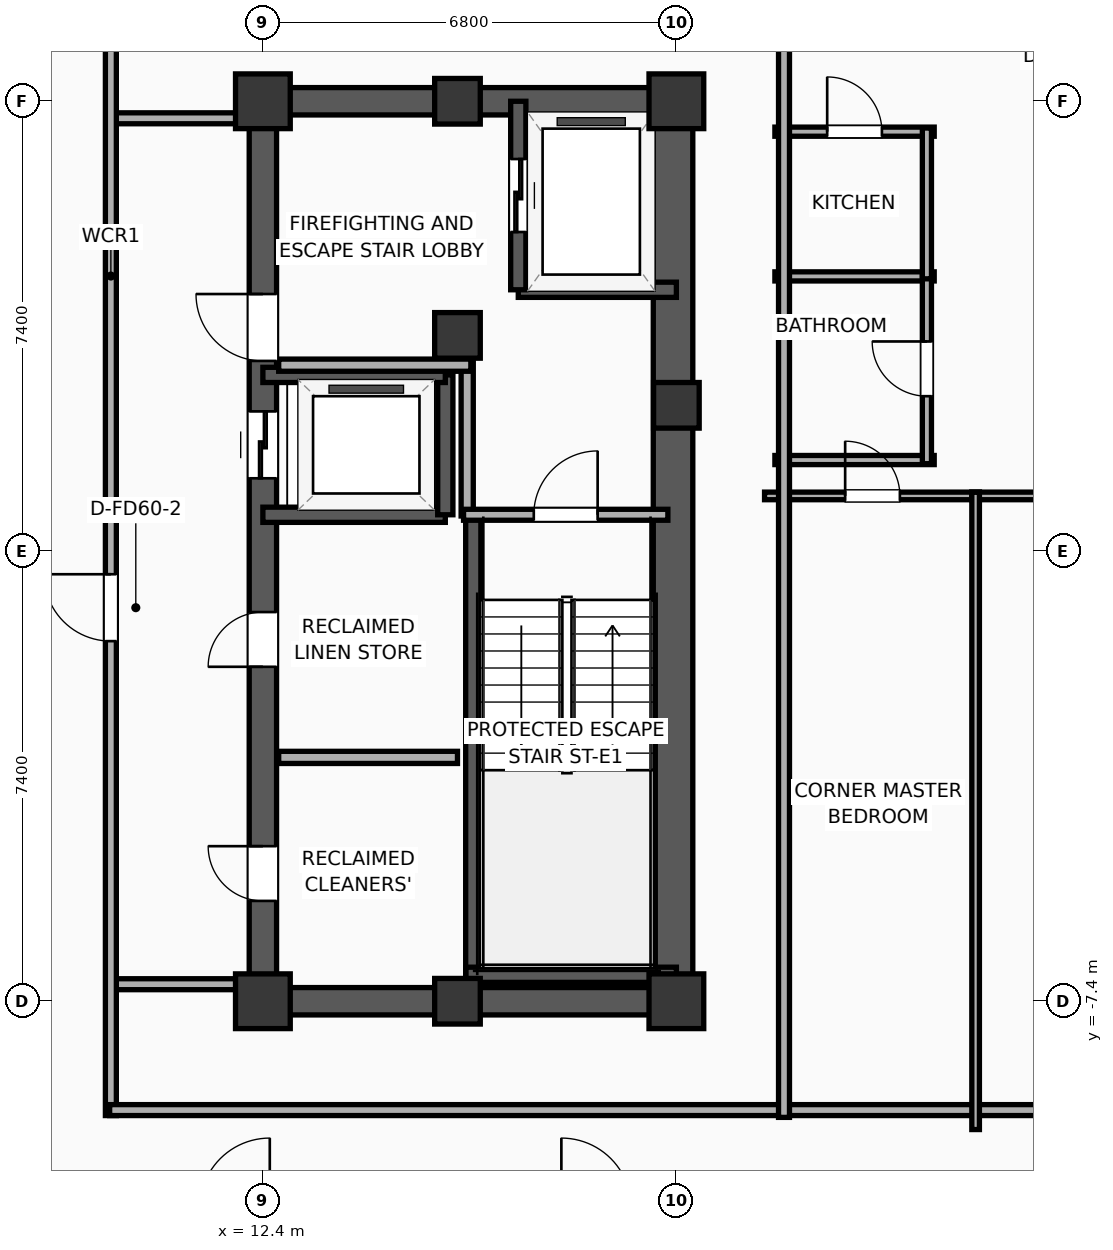
"""IFC4 building model, lengths in metres.
Left out: names, types, materials, properties, quantities, classifications, styles, units other than length and angle.
Written with IfcOpenShell. Run it as: python <this file> out.ifc"""

import sys

from ifc_helpers import new_model, si_unit, direction, frame, frame_2d, origin, origin_2d, place, context, subcontext, project, spatial, rectangle, extrude, element, fill, save


model = new_model("IFC4")
c1 = context("Model", 3, precision=1e-05, world=origin(), true_north=direction((0.0, 1.0)))
c2 = subcontext(c1, "Body", "Model", "MODEL_VIEW")
j1 = project(units=[si_unit("LENGTHUNIT", "METRE"), si_unit("PLANEANGLEUNIT", "RADIAN")], contexts=[c1])
p1 = place(None, origin())
s1 = spatial("IfcSite", under=j1, at=p1, CompositionType="ELEMENT")
p2 = place(p1, origin())
s2 = spatial("IfcBuilding", under=s1, at=p2, CompositionType="ELEMENT")
p3 = place(p2, frame((0.0, 0.0, 219.7)))
s3 = spatial("IfcBuildingStorey", under=s2, at=p3, CompositionType="ELEMENT", Elevation=219.7)
p4 = place(p3, frame((12.4, -7.4, 0.0), z_axis=(0.0, 0.0, 1.0), x_axis=(1.0, 0.0, 0.0)))
e1 = element("IfcColumn", 1, at=p4, inside=s3, PredefinedType="COLUMN", context=c2, shape_type="SweptSolid", body=[
    extrude(rectangle(XDim=0.9, YDim=0.9, at=origin_2d()), origin(), (0.0, 0.0, 1.0), 3.9),
])
p5 = place(p3, frame((15.6, 3.55, 0.0), z_axis=(0.0, 0.0, 1.0), x_axis=(1.0, 0.0, 0.0)))
e2 = element("IfcColumn", 2, at=p5, inside=s3, PredefinedType="COLUMN", context=c2, shape_type="SweptSolid", body=[
    extrude(rectangle(XDim=0.75, YDim=0.75, at=origin_2d()), origin(), (0.0, 0.0, 1.0), 3.9),
])
p6 = place(p3, frame((12.4, 7.4, 0.0), z_axis=(0.0, 0.0, 1.0), x_axis=(1.0, 0.0, 0.0)))
e3 = element("IfcColumn", 3, at=p6, inside=s3, PredefinedType="COLUMN", context=c2, shape_type="SweptSolid", body=[
    extrude(rectangle(XDim=0.9, YDim=0.9, at=origin_2d()), origin(), (0.0, 0.0, 1.0), 3.9),
])
for number, where, z_axis, x_axis in (
    (4, (15.6, -7.4, 0.0), (0.0, 0.0, 1.0), (1.0, 0.0, 0.0)),
    (5, (15.6, 7.4, 0.0), (0.0, 0.0, 1.0), (1.0, 0.0, 0.0)),
):
    element("IfcColumn", number, at=place(p3, frame(where, z_axis=z_axis, x_axis=x_axis)), inside=s3, PredefinedType="COLUMN", context=c2, shape_type="SweptSolid", body=[
        extrude(rectangle(XDim=0.75, YDim=0.75, at=origin_2d()), origin(), (0.0, 0.0, 1.0), 3.9),
    ])
p7 = place(p3, frame((19.2, -7.4, 0.0), z_axis=(0.0, 0.0, 1.0), x_axis=(1.0, 0.0, 0.0)))
e6 = element("IfcColumn", 6, at=p7, inside=s3, PredefinedType="COLUMN", context=c2, shape_type="SweptSolid", body=[
    extrude(rectangle(XDim=0.9, YDim=0.9, at=origin_2d()), origin(), (0.0, 0.0, 1.0), 3.9),
])
p8 = place(p3, frame((19.2, 2.4, 0.0), z_axis=(0.0, 0.0, 1.0), x_axis=(1.0, 0.0, 0.0)))
e7 = element("IfcColumn", 7, at=p8, inside=s3, PredefinedType="COLUMN", context=c2, shape_type="SweptSolid", body=[
    extrude(rectangle(XDim=0.75, YDim=0.75, at=origin_2d()), origin(), (0.0, 0.0, 1.0), 3.9),
])
p9 = place(p3, frame((19.2, 7.4, 0.0), z_axis=(0.0, 0.0, 1.0), x_axis=(1.0, 0.0, 0.0)))
e8 = element("IfcColumn", 8, at=p9, inside=s3, PredefinedType="COLUMN", context=c2, shape_type="SweptSolid", body=[
    extrude(rectangle(XDim=0.9, YDim=0.9, at=origin_2d()), origin(), (0.0, 0.0, 1.0), 3.9),
])
for number, where, z_axis, x_axis in (
    (9, (12.175, -7.4, 0.0), (0.0, 0.0, 1.0), (1.0, 0.0, 0.0)),
    (10, (12.175, 7.4, 0.0), (0.0, 0.0, 1.0), (1.0, 0.0, 0.0)),
):
    element("IfcWall", number, at=place(p3, frame(where, z_axis=z_axis, x_axis=x_axis)), inside=s3, PredefinedType="SHEAR", context=c2, shape_type="SweptSolid", body=[
        extrude(rectangle(XDim=7.25, YDim=0.45, at=frame_2d((3.625, 0.0))), origin(), (0.0, 0.0, 1.0), 3.65),
    ])
p10 = place(p3, frame((12.4, -7.4, 0.0), z_axis=(0.0, 0.0, 1.0), x_axis=(0.0, 1.0, 0.0)))
e11 = element("IfcWall", 11, at=p10, inside=s3, PredefinedType="SHEAR", context=c2, shape_type="SweptSolid", body=[
    extrude(rectangle(XDim=14.8, YDim=0.45, at=frame_2d((7.4, 0.0))), origin(), (0.0, 0.0, 1.0), 3.65),
])
p11 = place(p10, frame((8.6, 0.0, 0.0)))
e12 = element("IfcOpeningElement", 12, at=p11, cuts=e11, PredefinedType="OPENING", context=c2, shape_type="SweptSolid", body=[
    extrude(rectangle(XDim=1.1, YDim=2.05, at=frame_2d((0.55, 1.025))), frame((0.0, 0.235, 0.0), z_axis=(0.0, -1.0, 0.0), x_axis=(1.0, 0.0, 0.0)), (0.0, 0.0, 1.0), 0.47),
])
p12 = place(p10, frame((10.53, 0.0, 0.0)))
e13 = element("IfcOpeningElement", 13, at=p12, cuts=e11, PredefinedType="OPENING", context=c2, shape_type="SweptSolid", body=[
    extrude(rectangle(XDim=1.1, YDim=2.05, at=frame_2d((0.55, 1.025))), frame((0.0, 0.235, 0.0), z_axis=(0.0, -1.0, 0.0), x_axis=(1.0, 0.0, 0.0)), (0.0, 0.0, 1.0), 0.47),
])
p13 = place(p10, frame((1.65, 0.0, 0.0)))
e14 = element("IfcOpeningElement", 14, at=p13, cuts=e11, PredefinedType="OPENING", context=c2, shape_type="SweptSolid", body=[
    extrude(rectangle(XDim=0.9, YDim=2.05, at=frame_2d((0.45, 1.025))), frame((0.0, 0.235, 0.0), z_axis=(0.0, -1.0, 0.0), x_axis=(1.0, 0.0, 0.0)), (0.0, 0.0, 1.0), 0.47),
])
p14 = place(p10, frame((5.5, 0.0, 0.0)))
e15 = element("IfcOpeningElement", 15, at=p14, cuts=e11, PredefinedType="OPENING", context=c2, shape_type="SweptSolid", body=[
    extrude(rectangle(XDim=0.9, YDim=2.05, at=frame_2d((0.45, 1.025))), frame((0.0, 0.235, 0.0), z_axis=(0.0, -1.0, 0.0), x_axis=(1.0, 0.0, 0.0)), (0.0, 0.0, 1.0), 0.47),
])
p15 = place(p3, frame((19.145, -7.4, 0.0), z_axis=(0.0, 0.0, 1.0), x_axis=(0.0, 1.0, 0.0)))
e16 = element("IfcWall", 16, at=p15, inside=s3, PredefinedType="SHEAR", context=c2, shape_type="SweptSolid", body=[
    extrude(rectangle(XDim=14.8, YDim=0.65, at=frame_2d((7.4, 0.0))), origin(), (0.0, 0.0, 1.0), 3.65),
])
p16 = place(p3, frame((15.86, -7.085, 0.0), z_axis=(0.0, 0.0, 1.0), x_axis=(0.0, 1.0, 0.0)))
e17 = element("IfcWall", 17, at=p16, inside=s3, PredefinedType="SOLIDWALL", context=c2, shape_type="SweptSolid", body=[
    extrude(rectangle(XDim=7.685, YDim=0.25, at=frame_2d((3.843, 0.0))), origin(), (0.0, 0.0, 1.0), 3.65),
])
p17 = place(p3, frame((15.74, -6.965, 0.0), z_axis=(0.0, 0.0, 1.0), x_axis=(1.0, 0.0, 0.0)))
e18 = element("IfcWall", 18, at=p17, inside=s3, PredefinedType="SOLIDWALL", context=c2, shape_type="SweptSolid", body=[
    extrude(rectangle(XDim=3.46, YDim=0.25, at=frame_2d((1.73, 0.0))), origin(), (0.0, 0.0, 1.0), 3.65),
])
p18 = place(p3, frame((16.6, 4.3, 0.0), z_axis=(0.0, 0.0, 1.0), x_axis=(1.0, 0.0, 0.0)))
e19 = element("IfcWall", 19, at=p18, inside=s3, PredefinedType="SOLIDWALL", context=c2, shape_type="SweptSolid", body=[
    extrude(rectangle(XDim=2.6, YDim=0.25, at=frame_2d((1.3, 0.0))), origin(), (0.0, 0.0, 1.0), 3.65),
])
p19 = place(p3, frame((16.6, 7.4, 0.0), z_axis=(0.0, 0.0, 1.0), x_axis=(0.0, -1.0, 0.0)))
e20 = element("IfcWall", 20, at=p19, inside=s3, PredefinedType="SOLIDWALL", context=c2, shape_type="SweptSolid", body=[
    extrude(rectangle(XDim=3.1, YDim=0.25, at=frame_2d((1.55, 0.0))), origin(), (0.0, 0.0, 1.0), 3.65),
])
p20 = place(p19, frame((0.95, 0.0, 0.0)))
e21 = element("IfcOpeningElement", 21, at=p20, cuts=e20, PredefinedType="OPENING", context=c2, shape_type="SweptSolid", body=[
    extrude(rectangle(XDim=1.2, YDim=2.05, at=frame_2d((0.6, 1.025))), frame((0.0, 0.135, 0.0), z_axis=(0.0, -1.0, 0.0), x_axis=(1.0, 0.0, 0.0)), (0.0, 0.0, 1.0), 0.27),
])
p21 = place(p3, frame((12.4, 0.6, 0.0), z_axis=(0.0, 0.0, 1.0), x_axis=(1.0, 0.0, 0.0)))
e22 = element("IfcWall", 22, at=p21, inside=s3, PredefinedType="SOLIDWALL", context=c2, shape_type="SweptSolid", body=[
    extrude(rectangle(XDim=3.0, YDim=0.25, at=frame_2d((1.5, 0.0))), origin(), (0.0, 0.0, 1.0), 3.65),
])
p22 = place(p3, frame((15.4, 0.6, 0.0), z_axis=(0.0, 0.0, 1.0), x_axis=(0.0, 1.0, 0.0)))
e23 = element("IfcWall", 23, at=p22, inside=s3, PredefinedType="SOLIDWALL", context=c2, shape_type="SweptSolid", body=[
    extrude(rectangle(XDim=2.3, YDim=0.25, at=frame_2d((1.15, 0.0))), origin(), (0.0, 0.0, 1.0), 3.65),
])
p23 = place(p3, frame((15.4, 2.9, 0.0), z_axis=(0.0, 0.0, 1.0), x_axis=(-1.0, 0.0, 0.0)))
e24 = element("IfcWall", 24, at=p23, inside=s3, PredefinedType="SOLIDWALL", context=c2, shape_type="SweptSolid", body=[
    extrude(rectangle(XDim=3.0, YDim=0.25, at=frame_2d((1.5, 0.0))), origin(), (0.0, 0.0, 1.0), 3.65),
])
p24 = place(p3, frame((15.76, 0.58, 0.0), z_axis=(0.0, 0.0, 1.0), x_axis=(0.0, 1.0, 0.0)))
e25 = element("IfcWall", 25, at=p24, inside=s3, PredefinedType="PARTITIONING", context=c2, shape_type="SweptSolid", body=[
    extrude(rectangle(XDim=2.52, YDim=0.2, at=frame_2d((1.26, 0.0))), origin(), (0.0, 0.0, 1.0), 3.65),
])
p25 = place(p3, frame((12.66, 3.06, 0.0), z_axis=(0.0, 0.0, 1.0), x_axis=(1.0, 0.0, 0.0)))
e26 = element("IfcWall", 26, at=p25, inside=s3, PredefinedType="PARTITIONING", context=c2, shape_type="SweptSolid", body=[
    extrude(rectangle(XDim=3.16, YDim=0.2, at=frame_2d((1.58, 0.0))), origin(), (0.0, 0.0, 1.0), 3.65),
])
p26 = place(p3, frame((15.7, 0.6, 0.0), z_axis=(0.0, 0.0, 1.0), x_axis=(1.0, 0.0, 0.0)))
e27 = element("IfcWall", 27, at=p26, inside=s3, PredefinedType="PARTITIONING", context=c2, shape_type="SweptSolid", body=[
    extrude(rectangle(XDim=3.36, YDim=0.18, at=frame_2d((1.68, 0.0))), origin(), (0.0, 0.0, 1.0), 3.65),
])
p27 = place(p26, frame((1.155, 0.0, 0.0)))
e28 = element("IfcOpeningElement", 28, at=p27, cuts=e27, PredefinedType="OPENING", context=c2, shape_type="SweptSolid", body=[
    extrude(rectangle(XDim=1.05, YDim=2.05, at=frame_2d((0.525, 1.025))), frame((0.0, 0.1, 0.0), z_axis=(0.0, -1.0, 0.0), x_axis=(1.0, 0.0, 0.0)), (0.0, 0.0, 1.0), 0.2),
])
p28 = place(p3, frame((12.66, -3.39, 0.0), z_axis=(0.0, 0.0, 1.0), x_axis=(1.0, 0.0, 0.0)))
e29 = element("IfcWall", 29, at=p28, inside=s3, PredefinedType="PARTITIONING", context=c2, shape_type="SweptSolid", body=[
    extrude(rectangle(XDim=2.94, YDim=0.2, at=frame_2d((1.47, 0.0))), origin(), (0.0, 0.0, 1.0), 3.65),
])
for number, where, z_axis, x_axis in (
    (30, (9.88, 7.12, 0.0), (0.0, 0.0, 1.0), (1.0, 0.0, 0.0)),
    (31, (9.88, -7.12, 0.0), (0.0, 0.0, 1.0), (1.0, 0.0, 0.0)),
):
    element("IfcWall", number, at=place(p3, frame(where, z_axis=z_axis, x_axis=x_axis)), inside=s3, PredefinedType="PARTITIONING", context=c2, shape_type="SweptSolid", body=[
        extrude(rectangle(XDim=2.27, YDim=0.18, at=frame_2d((1.135, 0.0))), origin(), (0.0, 0.0, 1.0), 3.65),
    ])
p29 = place(p3, frame((9.9, -9.28, 0.0), z_axis=(0.0, 0.0, 1.0), x_axis=(0.0, 1.0, 0.0)))
e32 = element("IfcWall", 32, at=p29, inside=s3, PredefinedType="PARTITIONING", context=c2, shape_type="SweptSolid", body=[
    extrude(rectangle(XDim=18.56, YDim=0.18, at=frame_2d((9.28, 0.0))), origin(), (0.0, 0.0, 1.0), 3.65),
])
p30 = place(p29, frame((7.802, 0.0, 0.0)))
e33 = element("IfcOpeningElement", 33, at=p30, cuts=e32, PredefinedType="OPENING", context=c2, shape_type="SweptSolid", body=[
    extrude(rectangle(XDim=1.1, YDim=2.05, at=frame_2d((0.55, 1.025))), frame((0.0, 0.1, 0.0), z_axis=(0.0, -1.0, 0.0), x_axis=(1.0, 0.0, 0.0)), (0.0, 0.0, 1.0), 0.2),
])
p31 = place(p3, frame((9.88, -9.19, 0.0), z_axis=(0.0, 0.0, 1.0), x_axis=(1.0, 0.0, 0.0)))
e34 = element("IfcWall", 34, at=p31, inside=s3, PredefinedType="PARTITIONING", context=c2, shape_type="SweptSolid", body=[
    extrude(rectangle(XDim=20.35, YDim=0.18, at=frame_2d((10.175, 0.0))), origin(), (0.0, 0.0, 1.0), 3.65),
])
p32 = place(p3, frame((20.82, 6.9, 0.0), z_axis=(0.0, 0.0, 1.0), x_axis=(1.0, 0.0, 0.0)))
e35 = element("IfcWall", 35, at=p32, inside=s3, PredefinedType="PLUMBINGWALL", context=c2, shape_type="SweptSolid", body=[
    extrude(rectangle(XDim=2.62, YDim=0.15, at=frame_2d((1.31, 0.0))), origin(), (0.0, 0.0, 1.0), 3.65),
])
p33 = place(p32, frame((0.86, 0.0, 0.0)))
e36 = element("IfcOpeningElement", 36, at=p33, cuts=e35, PredefinedType="OPENING", context=c2, shape_type="SweptSolid", body=[
    extrude(rectangle(XDim=0.9, YDim=2.05, at=frame_2d((0.45, 1.025))), frame((0.0, 0.085, 0.0), z_axis=(0.0, -1.0, 0.0), x_axis=(1.0, 0.0, 0.0)), (0.0, 0.0, 1.0), 0.17),
])
for number, where, z_axis, x_axis in (
    (37, (20.82, 4.52, 0.0), (0.0, 0.0, 1.0), (1.0, 0.0, 0.0)),
    (38, (20.82, 1.5, 0.0), (0.0, 0.0, 1.0), (1.0, 0.0, 0.0)),
):
    element("IfcWall", number, at=place(p3, frame(where, z_axis=z_axis, x_axis=x_axis)), inside=s3, PredefinedType="PLUMBINGWALL", context=c2, shape_type="SweptSolid", body=[
        extrude(rectangle(XDim=2.62, YDim=0.15, at=frame_2d((1.31, 0.0))), origin(), (0.0, 0.0, 1.0), 3.65),
    ])
p34 = place(p3, frame((23.32, 1.44, 0.0), z_axis=(0.0, 0.0, 1.0), x_axis=(0.0, 1.0, 0.0)))
e39 = element("IfcWall", 39, at=p34, inside=s3, PredefinedType="PLUMBINGWALL", context=c2, shape_type="SweptSolid", body=[
    extrude(rectangle(XDim=3.12, YDim=0.15, at=frame_2d((1.56, 0.0))), origin(), (0.0, 0.0, 1.0), 3.65),
])
p35 = place(p34, frame((1.11, 0.0, 0.0)))
e40 = element("IfcOpeningElement", 40, at=p35, cuts=e39, PredefinedType="OPENING", context=c2, shape_type="SweptSolid", body=[
    extrude(rectangle(XDim=0.9, YDim=2.05, at=frame_2d((0.45, 1.025))), frame((0.0, 0.085, 0.0), z_axis=(0.0, -1.0, 0.0), x_axis=(1.0, 0.0, 0.0)), (0.0, 0.0, 1.0), 0.17),
])
p36 = place(p3, frame((23.32, 4.48, 0.0), z_axis=(0.0, 0.0, 1.0), x_axis=(0.0, 1.0, 0.0)))
e41 = element("IfcWall", 41, at=p36, inside=s3, PredefinedType="PLUMBINGWALL", context=c2, shape_type="SweptSolid", body=[
    extrude(rectangle(XDim=2.48, YDim=0.15, at=frame_2d((1.24, 0.0))), origin(), (0.0, 0.0, 1.0), 3.65),
])
p37 = place(p3, frame((20.65, 0.91, 0.0), z_axis=(0.0, 0.0, 1.0), x_axis=(1.0, 0.0, 0.0)))
e42 = element("IfcWall", 42, at=p37, inside=s3, PredefinedType="PARTITIONING", context=c2, shape_type="SweptSolid", body=[
    extrude(rectangle(XDim=3.534, YDim=0.125, at=frame_2d((1.767, 0.0))), origin(), (0.0, 0.0, 1.0), 3.65),
])
p38 = place(p37, frame((1.325, 0.0, 0.0)))
e43 = element("IfcOpeningElement", 43, at=p38, cuts=e42, PredefinedType="OPENING", context=c2, shape_type="SweptSolid", body=[
    extrude(rectangle(XDim=0.9, YDim=2.05, at=frame_2d((0.45, 1.025))), frame((0.0, 0.073, 0.0), z_axis=(0.0, -1.0, 0.0), x_axis=(1.0, 0.0, 0.0)), (0.0, 0.0, 1.0), 0.145),
])
p39 = place(p3, frame((24.059, 0.91, 0.0), z_axis=(0.0, 0.0, 1.0), x_axis=(1.0, 0.0, 0.0)))
e44 = element("IfcWall", 44, at=p39, inside=s3, PredefinedType="PARTITIONING", context=c2, shape_type="SweptSolid", body=[
    extrude(rectangle(XDim=3.183, YDim=0.125, at=frame_2d((1.591, 0.0))), origin(), (0.0, 0.0, 1.0), 3.65),
])
p40 = place(p39, frame((1.142, 0.0, 0.0)))
e45 = element("IfcOpeningElement", 45, at=p40, cuts=e44, PredefinedType="OPENING", context=c2, shape_type="SweptSolid", body=[
    extrude(rectangle(XDim=0.9, YDim=2.05, at=frame_2d((0.45, 1.025))), frame((0.0, 0.073, 0.0), z_axis=(0.0, -1.0, 0.0), x_axis=(1.0, 0.0, 0.0)), (0.0, 0.0, 1.0), 0.145),
])
p41 = place(p3, frame((24.121, -9.51, 0.0), z_axis=(0.0, 0.0, 1.0), x_axis=(0.0, 1.0, 0.0)))
e46 = element("IfcWall", 46, at=p41, inside=s3, PredefinedType="PARTITIONING", context=c2, shape_type="SweptSolid", body=[
    extrude(rectangle(XDim=10.48, YDim=0.125, at=frame_2d((5.24, 0.0))), origin(), (0.0, 0.0, 1.0), 3.65),
])
p42 = place(p3, frame((20.97, -9.31, 0.0), z_axis=(0.0, 0.0, 1.0), x_axis=(0.0, 1.0, 0.0)))
e47 = element("IfcWall", 47, at=p42, inside=s3, PredefinedType="PARTITIONING", context=c2, shape_type="SweptSolid", body=[
    extrude(rectangle(XDim=18.62, YDim=0.18, at=frame_2d((9.31, 0.0))), origin(), (0.0, 0.0, 1.0), 3.65),
])
p43 = place(p20, origin())
e48 = element("IfcDoor", 48, at=p43, inside=s3, OperationType="SLIDING_TO_LEFT", PredefinedType="DOOR", context=c2, shape_type="SweptSolid", body=[
    extrude(rectangle(XDim=1.2, YDim=2.05, at=frame_2d((0.6, 1.025))), frame((0.0, 0.025, 0.0), z_axis=(0.0, -1.0, 0.0), x_axis=(1.0, 0.0, 0.0)), (0.0, 0.0, 1.0), 0.05),
])
fill(e21, e48)
p44 = place(p11, origin())
e49 = element("IfcDoor", 49, at=p44, inside=s3, OperationType="SLIDING_TO_LEFT", PredefinedType="DOOR", context=c2, shape_type="SweptSolid", body=[
    extrude(rectangle(XDim=1.1, YDim=2.05, at=frame_2d((0.55, 1.025))), frame((0.0, 0.025, 0.0), z_axis=(0.0, -1.0, 0.0), x_axis=(1.0, 0.0, 0.0)), (0.0, 0.0, 1.0), 0.05),
])
fill(e12, e49)
p45 = place(p27, origin())
e50 = element("IfcDoor", 50, at=p45, inside=s3, OperationType="SINGLE_SWING_RIGHT", PredefinedType="DOOR", context=c2, shape_type="SweptSolid", body=[
    extrude(rectangle(XDim=1.05, YDim=2.05, at=frame_2d((0.525, 1.025))), frame((0.0, 0.025, 0.0), z_axis=(0.0, -1.0, 0.0), x_axis=(1.0, 0.0, 0.0)), (0.0, 0.0, 1.0), 0.05),
])
fill(e28, e50)
p46 = place(p30, origin())
e51 = element("IfcDoor", 51, at=p46, inside=s3, OperationType="SINGLE_SWING_RIGHT", PredefinedType="DOOR", context=c2, shape_type="SweptSolid", body=[
    extrude(rectangle(XDim=1.1, YDim=2.05, at=frame_2d((0.55, 1.025))), frame((0.0, 0.025, 0.0), z_axis=(0.0, -1.0, 0.0), x_axis=(1.0, 0.0, 0.0)), (0.0, 0.0, 1.0), 0.05),
])
fill(e33, e51)
p47 = place(p33, origin())
e52 = element("IfcDoor", 52, at=p47, inside=s3, OperationType="SINGLE_SWING_LEFT", PredefinedType="DOOR", context=c2, shape_type="SweptSolid", body=[
    extrude(rectangle(XDim=0.9, YDim=2.05, at=frame_2d((0.45, 1.025))), frame((0.0, 0.025, 0.0), z_axis=(0.0, -1.0, 0.0), x_axis=(1.0, 0.0, 0.0)), (0.0, 0.0, 1.0), 0.05),
])
fill(e36, e52)
p48 = place(p35, origin())
e53 = element("IfcDoor", 53, at=p48, inside=s3, OperationType="SINGLE_SWING_RIGHT", PredefinedType="DOOR", context=c2, shape_type="SweptSolid", body=[
    extrude(rectangle(XDim=0.9, YDim=2.05, at=frame_2d((0.45, 1.025))), frame((0.0, 0.025, 0.0), z_axis=(0.0, -1.0, 0.0), x_axis=(1.0, 0.0, 0.0)), (0.0, 0.0, 1.0), 0.05),
])
fill(e40, e53)
p49 = place(p38, origin())
e54 = element("IfcDoor", 54, at=p49, inside=s3, OperationType="SINGLE_SWING_LEFT", PredefinedType="DOOR", context=c2, shape_type="SweptSolid", body=[
    extrude(rectangle(XDim=0.9, YDim=2.05, at=frame_2d((0.45, 1.025))), frame((0.0, 0.025, 0.0), z_axis=(0.0, -1.0, 0.0), x_axis=(1.0, 0.0, 0.0)), (0.0, 0.0, 1.0), 0.05),
])
fill(e43, e54)
p50 = place(p12, origin())
e55 = element("IfcDoor", 55, at=p50, inside=s3, OperationType="SINGLE_SWING_RIGHT", PredefinedType="DOOR", context=c2, shape_type="SweptSolid", body=[
    extrude(rectangle(XDim=1.1, YDim=2.05, at=frame_2d((0.55, 1.025))), frame((0.0, 0.025, 0.0), z_axis=(0.0, -1.0, 0.0), x_axis=(1.0, 0.0, 0.0)), (0.0, 0.0, 1.0), 0.05),
])
fill(e13, e55)
p51 = place(p13, origin())
e56 = element("IfcDoor", 56, at=p51, inside=s3, OperationType="SINGLE_SWING_RIGHT", PredefinedType="DOOR", context=c2, shape_type="SweptSolid", body=[
    extrude(rectangle(XDim=0.9, YDim=2.05, at=frame_2d((0.45, 1.025))), frame((0.0, 0.025, 0.0), z_axis=(0.0, -1.0, 0.0), x_axis=(1.0, 0.0, 0.0)), (0.0, 0.0, 1.0), 0.05),
])
fill(e14, e56)
p52 = place(p14, origin())
e57 = element("IfcDoor", 57, at=p52, inside=s3, OperationType="SINGLE_SWING_LEFT", PredefinedType="DOOR", context=c2, shape_type="SweptSolid", body=[
    extrude(rectangle(XDim=0.9, YDim=2.05, at=frame_2d((0.45, 1.025))), frame((0.0, 0.025, 0.0), z_axis=(0.0, -1.0, 0.0), x_axis=(1.0, 0.0, 0.0)), (0.0, 0.0, 1.0), 0.05),
])
fill(e15, e57)
save(model, sys.argv[1])
